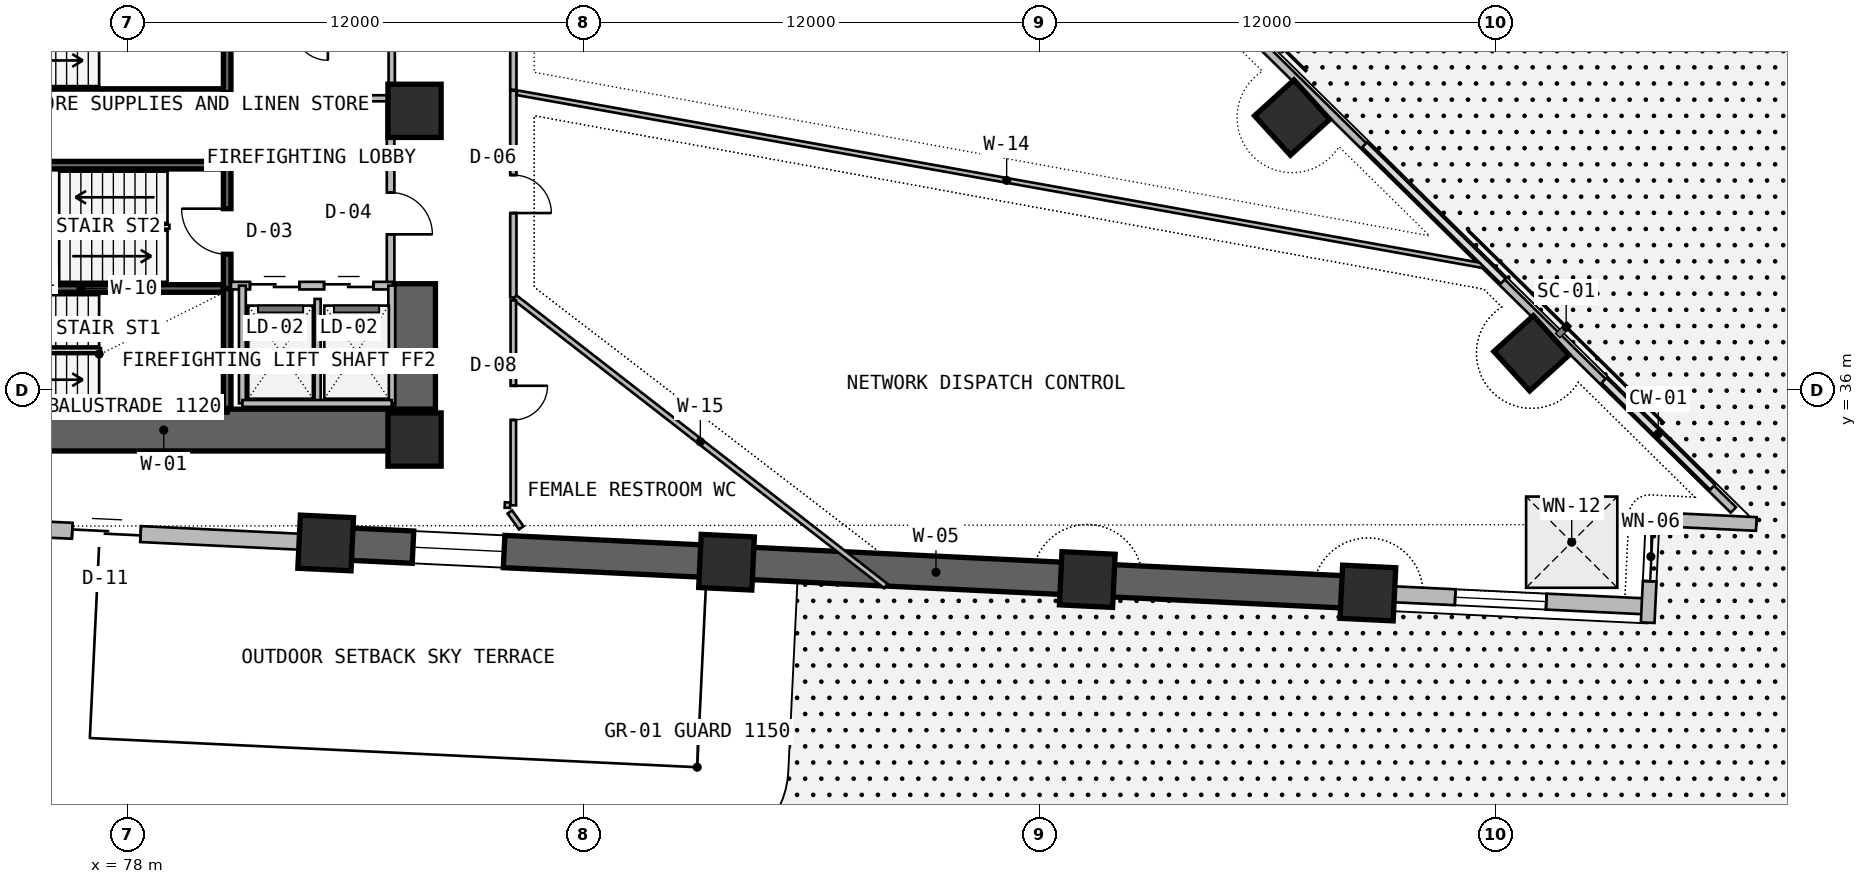
"""IFC4 building model, lengths in metres.
Left out: names, types, materials, properties, quantities, classifications, styles, units other than length and angle.
Written with IfcOpenShell. Run it as: python <this file> out.ifc"""

import sys

from ifc_helpers import new_model, si_unit, direction, frame, frame_2d, origin, origin_2d, place, context, subcontext, project, spatial, rectangle, extrude, element, fill, save


model = new_model("IFC4")
c1 = context("Model", 3, precision=1e-05, world=origin(), true_north=direction((0.0, 1.0)))
c2 = subcontext(c1, "Body", "Model", "MODEL_VIEW")
j1 = project(units=[si_unit("LENGTHUNIT", "METRE"), si_unit("PLANEANGLEUNIT", "RADIAN")], contexts=[c1])
p1 = place(None, origin())
s1 = spatial("IfcSite", under=j1, at=p1, CompositionType="ELEMENT")
p2 = place(p1, origin())
s2 = spatial("IfcBuilding", under=s1, at=p2, CompositionType="ELEMENT")
p3 = place(p2, frame((0.0, 0.0, 26.7)))
s3 = spatial("IfcBuildingStorey", under=s2, at=p3, CompositionType="ELEMENT", Elevation=26.7)
p4 = place(p3, frame((71.8, 34.95, -0.4), z_axis=(0.0, 0.0, 1.0), x_axis=(1.0, 0.0, 0.0)))
e1 = element("IfcWall", 1, at=p4, inside=s3, PredefinedType="SHEAR", context=c2, shape_type="SweptSolid", body=[
    extrude(rectangle(XDim=14.3, YDim=1.1, at=frame_2d((7.15, 0.0))), origin(), (0.0, 0.0, 1.0), 3.8),
])
p5 = place(p3, frame((85.55, 35.5, -0.4), z_axis=(0.0, 0.0, 1.0), x_axis=(0.0, 1.0, 0.0)))
e2 = element("IfcWall", 2, at=p5, inside=s3, PredefinedType="SHEAR", context=c2, shape_type="SweptSolid", body=[
    extrude(rectangle(XDim=3.3, YDim=1.1, at=frame_2d((1.65, 0.0))), origin(), (0.0, 0.0, 1.0), 3.8),
])
for number, where, z_axis, x_axis in (
    (3, (85.55, 34.7, 0.0), (0.0, 0.0, 1.0), (1.0, 0.0, 0.0)),
    (4, (85.55, 43.35, 0.0), (0.0, 0.0, 1.0), (1.0, 0.0, 0.0)),
    (5, (83.212, 31.979, 0.0), (0.0, 0.0, 1.0), (-0.999, 0.048, 0.0)),
    (6, (93.76, 31.472, 0.0), (0.0, 0.0, 1.0), (-0.999, 0.048, 0.0)),
    (7, (103.253, 31.017, 0.0), (0.0, 0.0, 1.0), (-0.999, 0.048, 0.0)),
    (8, (110.636, 30.662, 0.0), (0.0, 0.0, 1.0), (-0.999, 0.048, 0.0)),
    (9, (114.942, 36.97, 0.0), (0.0, 0.0, 1.0), (0.74, 0.672, 0.0)),
    (10, (108.644, 43.172, 0.0), (0.0, 0.0, 1.0), (0.74, 0.672, 0.0)),
):
    element("IfcColumn", number, at=place(p3, frame(where, z_axis=z_axis, x_axis=x_axis)), inside=s3, PredefinedType="COLUMN", context=c2, shape_type="SweptSolid", body=[
        extrude(rectangle(XDim=1.4, YDim=1.4, at=origin_2d()), origin(), (0.0, 0.0, 1.0), 3.6),
    ])
p6 = place(p3, frame((65.281, 32.841, 0.0), z_axis=(0.0, 0.0, 1.0), x_axis=(0.998848298084, -0.047979968897, 0.0)))
e11 = element("IfcWall", 11, at=p6, inside=s3, PredefinedType="SOLIDWALL", context=c2, shape_type="SweptSolid", body=[
    extrude(rectangle(XDim=17.952, YDim=0.42, at=frame_2d((8.976, 0.0))), origin(), (0.0, 0.0, 1.0), 2.385),
])
p7 = place(p6, frame((11.276, 0.0, 0.0)))
e12 = element("IfcOpeningElement", 12, at=p7, cuts=e11, PredefinedType="OPENING", context=c2, shape_type="SweptSolid", body=[
    extrude(rectangle(XDim=1.8, YDim=2.35, at=frame_2d((0.9, 1.175))), frame((0.0, 0.22, 0.0), z_axis=(0.0, -1.0, 0.0), x_axis=(1.0, 0.0, 0.0)), (0.0, 0.0, 1.0), 0.44),
])
p8 = place(p6, frame((0.9, 0.0, 1.2)))
e13 = element("IfcOpeningElement", 13, at=p8, cuts=e11, PredefinedType="OPENING", context=c2, shape_type="SweptSolid", body=[
    extrude(rectangle(XDim=2.4, YDim=0.9, at=frame_2d((1.2, 0.45))), frame((0.0, 0.22, 0.0), z_axis=(0.0, -1.0, 0.0), x_axis=(1.0, 0.0, 0.0)), (0.0, 0.0, 1.0), 0.44),
])
p9 = place(p3, frame((83.212, 31.979, -0.4), z_axis=(0.0, 0.0, 1.0), x_axis=(0.998848235141, -0.047981279227, 0.0)))
e14 = element("IfcWall", 14, at=p9, inside=s3, PredefinedType="SHEAR", context=c2, shape_type="SweptSolid", body=[
    extrude(rectangle(XDim=27.456, YDim=0.85, at=frame_2d((13.728, 0.0))), origin(), (0.0, 0.0, 1.0), 3.8),
])
p10 = place(p9, frame((2.3, 0.0, 1.2)))
e15 = element("IfcOpeningElement", 15, at=p10, cuts=e14, PredefinedType="OPENING", context=c2, shape_type="SweptSolid", body=[
    extrude(rectangle(XDim=2.4, YDim=0.9, at=frame_2d((1.2, 0.45))), frame((0.0, 0.435, 0.0), z_axis=(0.0, -1.0, 0.0), x_axis=(1.0, 0.0, 0.0)), (0.0, 0.0, 1.0), 0.87),
])
p11 = place(p3, frame((110.636, 30.662, 0.0), z_axis=(0.0, 0.0, 1.0), x_axis=(0.998847872759, -0.047988822508, 0.0)))
e16 = element("IfcWall", 16, at=p11, inside=s3, PredefinedType="SOLIDWALL", context=c2, shape_type="SweptSolid", body=[
    extrude(rectangle(XDim=7.392, YDim=0.42, at=frame_2d((3.696, 0.0))), origin(), (0.0, 0.0, 1.0), 2.385),
])
p12 = place(p11, frame((2.3, 0.0, 1.2)))
e17 = element("IfcOpeningElement", 17, at=p12, cuts=e16, PredefinedType="OPENING", context=c2, shape_type="SweptSolid", body=[
    extrude(rectangle(XDim=2.4, YDim=0.9, at=frame_2d((1.2, 0.45))), frame((0.0, 0.22, 0.0), z_axis=(0.0, -1.0, 0.0), x_axis=(1.0, 0.0, 0.0)), (0.0, 0.0, 1.0), 0.44),
])
p13 = place(p3, frame((118.0, 29.883, 0.0), z_axis=(0.0, 0.0, 1.0), x_axis=(0.048024030708, 0.998846180588, 0.0)))
e18 = element("IfcWall", 18, at=p13, inside=s3, PredefinedType="SOLIDWALL", context=c2, shape_type="SweptSolid", body=[
    extrude(rectangle(XDim=2.73, YDim=0.36, at=frame_2d((1.365, 0.0))), origin(), (0.0, 0.0, 1.0), 3.4),
])
p14 = place(p13, frame((1.09, 0.0, 0.45)))
e19 = element("IfcOpeningElement", 19, at=p14, cuts=e18, PredefinedType="OPENING", context=c2, shape_type="SweptSolid", body=[
    extrude(rectangle(XDim=1.3, YDim=2.4, at=frame_2d((0.65, 1.2))), frame((0.0, 0.19, 0.0), z_axis=(0.0, -1.0, 0.0), x_axis=(1.0, 0.0, 0.0)), (0.0, 0.0, 1.0), 0.38),
])
p15 = place(p3, frame((118.131, 32.61, 0.0), z_axis=(0.0, 0.0, 1.0), x_axis=(0.998846180588, -0.048024030708, 0.0)))
e20 = element("IfcWall", 20, at=p15, inside=s3, PredefinedType="SOLIDWALL", context=c2, shape_type="SweptSolid", body=[
    extrude(rectangle(XDim=2.73, YDim=0.36, at=frame_2d((1.365, 0.0))), origin(), (0.0, 0.0, 1.0), 3.4),
])
p16 = place(p3, frame((120.254, 32.848, 0.0), z_axis=(0.0, 0.0, 1.0), x_axis=(-0.71254385441, 0.701627576099, 0.0)))
e21 = element("IfcWall", 21, at=p16, inside=s3, PredefinedType="PARAPET", context=c2, shape_type="SweptSolid", body=[
    extrude(rectangle(XDim=36.142, YDim=0.2, at=frame_2d((18.071, 0.0))), origin(), (0.0, 0.0, 1.0), 1.15),
])
for number, where, z_axis, x_axis in (
    (22, (72.92, 35.52, -0.4), (0.0, 0.0, 1.0), (1.0, 0.0, 0.0)),
    (23, (72.92, 38.675, -0.4), (0.0, 0.0, 1.0), (1.0, 0.0, 0.0)),
):
    element("IfcWall", number, at=place(p3, frame(where, z_axis=z_axis, x_axis=x_axis)), inside=s3, PredefinedType="SOLIDWALL", context=c2, shape_type="SweptSolid", body=[
        extrude(rectangle(XDim=7.7, YDim=0.2, at=frame_2d((3.85, 0.0))), origin(), (0.0, 0.0, 1.0), 3.8),
    ])
p17 = place(p3, frame((80.62, 35.52, -0.4), z_axis=(0.0, 0.0, 1.0), x_axis=(0.0, 1.0, 0.0)))
e24 = element("IfcWall", 24, at=p17, inside=s3, PredefinedType="SOLIDWALL", context=c2, shape_type="SweptSolid", body=[
    extrude(rectangle(XDim=3.155, YDim=0.2, at=frame_2d((1.578, 0.0))), origin(), (0.0, 0.0, 1.0), 3.8),
])
p18 = place(p3, frame((80.62, 38.675, -0.4), z_axis=(0.0, 0.0, 1.0), x_axis=(0.0, 1.0, 0.0)))
e25 = element("IfcWall", 25, at=p18, inside=s3, PredefinedType="SOLIDWALL", context=c2, shape_type="SweptSolid", body=[
    extrude(rectangle(XDim=3.245, YDim=0.2, at=frame_2d((1.623, 0.0))), origin(), (0.0, 0.0, 1.0), 3.8),
])
p19 = place(p18, frame((0.9, 0.0, 0.4)))
e26 = element("IfcOpeningElement", 26, at=p19, cuts=e25, PredefinedType="OPENING", context=c2, shape_type="SweptSolid", body=[
    extrude(rectangle(XDim=1.2, YDim=2.2, at=frame_2d((0.6, 1.1))), frame((0.0, 0.11, 0.0), z_axis=(0.0, -1.0, 0.0), x_axis=(1.0, 0.0, 0.0)), (0.0, 0.0, 1.0), 0.22),
])
p20 = place(p3, frame((80.72, 38.75, 0.0), z_axis=(0.0, 0.0, 1.0), x_axis=(1.0, 0.0, 0.0)))
e27 = element("IfcWall", 27, at=p20, inside=s3, PredefinedType="SOLIDWALL", context=c2, shape_type="SweptSolid", body=[
    extrude(rectangle(XDim=4.26, YDim=0.2, at=frame_2d((2.13, 0.0))), origin(), (0.0, 0.0, 1.0), 3.4),
])
p21 = place(p20, frame((0.5, 0.0, 0.0)))
e28 = element("IfcOpeningElement", 28, at=p21, cuts=e27, PredefinedType="OPENING", context=c2, shape_type="SweptSolid", body=[
    extrude(rectangle(XDim=1.3, YDim=2.3, at=frame_2d((0.65, 1.15))), frame((0.0, 0.11, 0.0), z_axis=(0.0, -1.0, 0.0), x_axis=(1.0, 0.0, 0.0)), (0.0, 0.0, 1.0), 0.22),
])
p22 = place(p20, frame((2.45, 0.0, 0.0)))
e29 = element("IfcOpeningElement", 29, at=p22, cuts=e27, PredefinedType="OPENING", context=c2, shape_type="SweptSolid", body=[
    extrude(rectangle(XDim=1.3, YDim=2.3, at=frame_2d((0.65, 1.15))), frame((0.0, 0.11, 0.0), z_axis=(0.0, -1.0, 0.0), x_axis=(1.0, 0.0, 0.0)), (0.0, 0.0, 1.0), 0.22),
])
p23 = place(p3, frame((83.0, 35.65, 0.0), z_axis=(0.0, 0.0, 1.0), x_axis=(0.0, 1.0, 0.0)))
e30 = element("IfcWall", 30, at=p23, inside=s3, PredefinedType="PLUMBINGWALL", context=c2, shape_type="SweptSolid", body=[
    extrude(rectangle(XDim=2.75, YDim=0.16, at=frame_2d((1.375, 0.0))), origin(), (0.0, 0.0, 1.0), 3.4),
])
for number, where, z_axis, x_axis in (
    (31, (84.95, 35.65, 0.0), (0.0, 0.0, 1.0), (0.0, 1.0, 0.0)),
    (32, (81.02, 35.65, 0.0), (0.0, 0.0, 1.0), (0.0, 1.0, 0.0)),
):
    element("IfcWall", number, at=place(p3, frame(where, z_axis=z_axis, x_axis=x_axis)), inside=s3, PredefinedType="SOLIDWALL", context=c2, shape_type="SweptSolid", body=[
        extrude(rectangle(XDim=3.1, YDim=0.18, at=frame_2d((1.55, 0.0))), origin(), (0.0, 0.0, 1.0), 3.4),
    ])
p24 = place(p3, frame((81.02, 35.65, 0.0), z_axis=(0.0, 0.0, 1.0), x_axis=(1.0, 0.0, 0.0)))
e33 = element("IfcWall", 33, at=p24, inside=s3, PredefinedType="SOLIDWALL", context=c2, shape_type="SweptSolid", body=[
    extrude(rectangle(XDim=3.93, YDim=0.18, at=frame_2d((1.965, 0.0))), origin(), (0.0, 0.0, 1.0), 3.4),
])
p25 = place(p3, frame((84.92, 38.85, 0.0), z_axis=(0.0, 0.0, 1.0), x_axis=(0.0, 1.0, 0.0)))
e34 = element("IfcWall", 34, at=p25, inside=s3, PredefinedType="SOLIDWALL", context=c2, shape_type="SweptSolid", body=[
    extrude(rectangle(XDim=4.83, YDim=0.2, at=frame_2d((2.415, 0.0))), origin(), (0.0, 0.0, 1.0), 3.4),
])
p26 = place(p25, frame((1.25, 0.0, 0.0)))
e35 = element("IfcOpeningElement", 35, at=p26, cuts=e34, PredefinedType="OPENING", context=c2, shape_type="SweptSolid", body=[
    extrude(rectangle(XDim=1.1, YDim=2.2, at=frame_2d((0.55, 1.1))), frame((0.0, 0.11, 0.0), z_axis=(0.0, -1.0, 0.0), x_axis=(1.0, 0.0, 0.0)), (0.0, 0.0, 1.0), 0.22),
])
p27 = place(p3, frame((72.92, 41.92, -0.4), z_axis=(0.0, 0.0, 1.0), x_axis=(1.0, 0.0, 0.0)))
e36 = element("IfcWall", 36, at=p27, inside=s3, PredefinedType="SOLIDWALL", context=c2, shape_type="SweptSolid", body=[
    extrude(rectangle(XDim=7.58, YDim=0.2, at=frame_2d((3.79, 0.0))), origin(), (0.0, 0.0, 1.0), 3.8),
])
p28 = place(p3, frame((72.92, 43.83, -0.4), z_axis=(0.0, 0.0, 1.0), x_axis=(1.0, 0.0, 0.0)))
e37 = element("IfcWall", 37, at=p28, inside=s3, PredefinedType="SOLIDWALL", context=c2, shape_type="SweptSolid", body=[
    extrude(rectangle(XDim=7.7, YDim=0.2, at=frame_2d((3.85, 0.0))), origin(), (0.0, 0.0, 1.0), 3.8),
])
p29 = place(p3, frame((80.62, 43.83, -0.4), z_axis=(0.0, 0.0, 1.0), x_axis=(0.0, 1.0, 0.0)))
e38 = element("IfcWall", 38, at=p29, inside=s3, PredefinedType="SOLIDWALL", context=c2, shape_type="SweptSolid", body=[
    extrude(rectangle(XDim=3.24, YDim=0.2, at=frame_2d((1.62, 0.0))), origin(), (0.0, 0.0, 1.0), 3.8),
])
p30 = place(p3, frame((84.95, 43.68, 0.0), z_axis=(0.0, 0.0, 1.0), x_axis=(0.0, 1.0, 0.0)))
e39 = element("IfcWall", 39, at=p30, inside=s3, PredefinedType="PLUMBINGWALL", context=c2, shape_type="SweptSolid", body=[
    extrude(rectangle(XDim=1.9, YDim=0.165, at=frame_2d((0.95, 0.0))), origin(), (0.0, 0.0, 1.0), 3.4),
])
p31 = place(p3, frame((80.76, 43.68, 0.0), z_axis=(0.0, 0.0, 1.0), x_axis=(1.0, 0.0, 0.0)))
e40 = element("IfcWall", 40, at=p31, inside=s3, PredefinedType="PLUMBINGWALL", context=c2, shape_type="SweptSolid", body=[
    extrude(rectangle(XDim=4.19, YDim=0.16, at=frame_2d((2.095, 0.0))), origin(), (0.0, 0.0, 1.0), 3.4),
])
p32 = place(p3, frame((88.15, 38.439, 0.0), z_axis=(0.0, 0.0, 1.0), x_axis=(0.0, 1.0, 0.0)))
e41 = element("IfcWall", 41, at=p32, inside=s3, PredefinedType="PARTITIONING", context=c2, shape_type="SweptSolid", body=[
    extrude(rectangle(XDim=5.441, YDim=0.165, at=frame_2d((2.72, 0.0))), origin(), (0.0, 0.0, 1.0), 2.785),
])
p33 = place(p32, frame((2.22, 0.0, 0.0)))
e42 = element("IfcOpeningElement", 42, at=p33, cuts=e41, PredefinedType="OPENING", context=c2, shape_type="SweptSolid", body=[
    extrude(rectangle(XDim=1.0, YDim=2.2, at=frame_2d((0.5, 1.1))), frame((0.0, 0.093, 0.0), z_axis=(0.0, -1.0, 0.0), x_axis=(1.0, 0.0, 0.0)), (0.0, 0.0, 1.0), 0.185),
])
p34 = place(p3, frame((97.954, 30.846, 0.0), z_axis=(0.0, 0.0, 1.0), x_axis=(-0.789412787299, 0.613862729972, 0.0)))
e43 = element("IfcWall", 43, at=p34, inside=s3, PredefinedType="PARTITIONING", context=c2, shape_type="SweptSolid", body=[
    extrude(rectangle(XDim=12.37, YDim=0.145, at=frame_2d((6.185, 0.0))), origin(), (0.0, 0.0, 1.0), 2.385),
])
p35 = place(p3, frame((88.244, 43.827, 0.0), z_axis=(0.0, 0.0, 1.0), x_axis=(0.984354244371, -0.176200799059, 0.0)))
e44 = element("IfcWall", 44, at=p35, inside=s3, PredefinedType="PARTITIONING", context=c2, shape_type="SweptSolid", body=[
    extrude(rectangle(XDim=26.183, YDim=0.125, at=frame_2d((13.092, 0.0))), origin(), (0.0, 0.0, 1.0), 2.785),
])
p36 = place(p3, frame((88.15, 32.969, 0.0), z_axis=(0.0, 0.0, 1.0), x_axis=(0.0, 1.0, 0.0)))
e45 = element("IfcWall", 45, at=p36, inside=s3, PredefinedType="PARTITIONING", context=c2, shape_type="SweptSolid", body=[
    extrude(rectangle(XDim=5.394, YDim=0.145, at=frame_2d((2.697, 0.0))), origin(), (0.0, 0.0, 1.0), 2.785),
])
p37 = place(p36, frame((2.247, 0.0, 0.0)))
e46 = element("IfcOpeningElement", 46, at=p37, cuts=e45, PredefinedType="OPENING", context=c2, shape_type="SweptSolid", body=[
    extrude(rectangle(XDim=0.9, YDim=2.1, at=frame_2d((0.45, 1.05))), frame((0.0, 0.083, 0.0), z_axis=(0.0, -1.0, 0.0), x_axis=(1.0, 0.0, 0.0)), (0.0, 0.0, 1.0), 0.165),
])
p38 = place(p3, frame((87.924, 32.979, 0.0), z_axis=(0.0, 0.0, 1.0), x_axis=(0.998828703523, -0.048386165569, 0.0)))
e47 = element("IfcWall", 47, at=p38, inside=s3, PredefinedType="PARTITIONING", context=c2, shape_type="SweptSolid", body=[
    extrude(rectangle(XDim=0.141, YDim=0.145, at=frame_2d((0.071, 0.0))), origin(), (0.0, 0.0, 1.0), 3.4),
])
p39 = place(p3, frame((88.15, 43.905, 0.0), z_axis=(0.0, 0.0, 1.0), x_axis=(0.0, 1.0, 0.0)))
e48 = element("IfcWall", 48, at=p39, inside=s3, PredefinedType="PARTITIONING", context=c2, shape_type="SweptSolid", body=[
    extrude(rectangle(XDim=12.312, YDim=0.165, at=frame_2d((6.156, 0.0))), origin(), (0.0, 0.0, 1.0), 2.785),
])
p40 = place(p39, frame((2.601, 0.0, 0.0)))
e49 = element("IfcOpeningElement", 49, at=p40, cuts=e48, PredefinedType="OPENING", context=c2, shape_type="SweptSolid", body=[
    extrude(rectangle(XDim=1.0, YDim=2.2, at=frame_2d((0.5, 1.1))), frame((0.0, 0.093, 0.0), z_axis=(0.0, -1.0, 0.0), x_axis=(1.0, 0.0, 0.0)), (0.0, 0.0, 1.0), 0.185),
])
p41 = place(p3, frame((88.358, 32.378, 0.0), z_axis=(0.0, 0.0, 1.0), x_axis=(-0.585265597374, 0.810841649479, 0.0)))
e50 = element("IfcWall", 50, at=p41, inside=s3, PredefinedType="PARTITIONING", context=c2, shape_type="SweptSolid", body=[
    extrude(rectangle(XDim=0.515, YDim=0.145, at=frame_2d((0.258, 0.0))), origin(), (0.0, 0.0, 1.0), 2.935),
])
p42 = place(p3, frame((0.0, 0.0, -0.35)))
p43 = place(p42, frame((116.0, 32.0, -0.01)))
p44 = place(p43, frame((0.0, 0.0, 0.31)))
e51 = element("IfcWindow", 51, at=p44, inside=s3, PartitioningType="SINGLE_PANEL", PredefinedType="SKYLIGHT", context=c2, shape_type="SweptSolid", body=[
    extrude(rectangle(XDim=2.4, YDim=2.4, at=origin_2d()), origin(), (0.0, 0.0, 1.0), 0.05),
])
p45 = place(p7, origin())
e52 = element("IfcDoor", 52, at=p45, inside=s3, OperationType="DOUBLE_DOOR_SLIDING", PredefinedType="DOOR", context=c2, shape_type="SweptSolid", body=[
    extrude(rectangle(XDim=1.8, YDim=2.35, at=frame_2d((0.9, 1.175))), frame((0.0, 0.025, 0.0), z_axis=(0.0, -1.0, 0.0), x_axis=(1.0, 0.0, 0.0)), (0.0, 0.0, 1.0), 0.05),
])
fill(e12, e52)
p46 = place(p10, origin())
e53 = element("IfcWindow", 53, at=p46, inside=s3, PartitioningType="SINGLE_PANEL", PredefinedType="WINDOW", context=c2, shape_type="SweptSolid", body=[
    extrude(rectangle(XDim=2.4, YDim=0.9, at=frame_2d((1.2, 0.45))), frame((0.0, 0.03, 0.0), z_axis=(0.0, -1.0, 0.0), x_axis=(1.0, 0.0, 0.0)), (0.0, 0.0, 1.0), 0.06),
])
fill(e15, e53)
p47 = place(p12, origin())
e54 = element("IfcWindow", 54, at=p47, inside=s3, PartitioningType="SINGLE_PANEL", PredefinedType="WINDOW", context=c2, shape_type="SweptSolid", body=[
    extrude(rectangle(XDim=2.4, YDim=0.9, at=frame_2d((1.2, 0.45))), frame((0.0, 0.03, 0.0), z_axis=(0.0, -1.0, 0.0), x_axis=(1.0, 0.0, 0.0)), (0.0, 0.0, 1.0), 0.06),
])
fill(e17, e54)
p48 = place(p14, origin())
e55 = element("IfcWindow", 55, at=p48, inside=s3, PartitioningType="SINGLE_PANEL", PredefinedType="WINDOW", context=c2, shape_type="SweptSolid", body=[
    extrude(rectangle(XDim=1.3, YDim=2.4, at=frame_2d((0.65, 1.2))), frame((0.0, 0.03, 0.0), z_axis=(0.0, -1.0, 0.0), x_axis=(1.0, 0.0, 0.0)), (0.0, 0.0, 1.0), 0.06),
])
fill(e19, e55)
p49 = place(p19, origin())
e56 = element("IfcDoor", 56, at=p49, inside=s3, OperationType="SINGLE_SWING_RIGHT", PredefinedType="USERDEFINED", context=c2, shape_type="SweptSolid", body=[
    extrude(rectangle(XDim=1.2, YDim=2.2, at=frame_2d((0.6, 1.1))), frame((0.0, 0.025, 0.0), z_axis=(0.0, -1.0, 0.0), x_axis=(1.0, 0.0, 0.0)), (0.0, 0.0, 1.0), 0.05),
])
fill(e26, e56)
p50 = place(p21, origin())
e57 = element("IfcDoor", 57, at=p50, inside=s3, OperationType="DOUBLE_DOOR_SLIDING", PredefinedType="DOOR", context=c2, shape_type="SweptSolid", body=[
    extrude(rectangle(XDim=1.3, YDim=2.3, at=frame_2d((0.65, 1.15))), frame((0.0, 0.025, 0.0), z_axis=(0.0, -1.0, 0.0), x_axis=(1.0, 0.0, 0.0)), (0.0, 0.0, 1.0), 0.05),
])
fill(e28, e57)
p51 = place(p22, origin())
e58 = element("IfcDoor", 58, at=p51, inside=s3, OperationType="DOUBLE_DOOR_SLIDING", PredefinedType="DOOR", context=c2, shape_type="SweptSolid", body=[
    extrude(rectangle(XDim=1.3, YDim=2.3, at=frame_2d((0.65, 1.15))), frame((0.0, 0.025, 0.0), z_axis=(0.0, -1.0, 0.0), x_axis=(1.0, 0.0, 0.0)), (0.0, 0.0, 1.0), 0.05),
])
fill(e29, e58)
p52 = place(p26, frame((1.1, 0.0, 0.0), z_axis=(0.0, 0.0, 1.0), x_axis=(-1.0, 0.0, 0.0)))
e59 = element("IfcDoor", 59, at=p52, inside=s3, OperationType="SINGLE_SWING_RIGHT", PredefinedType="DOOR", context=c2, shape_type="SweptSolid", body=[
    extrude(rectangle(XDim=1.1, YDim=2.2, at=frame_2d((0.55, 1.1))), frame((0.0, 0.025, 0.0), z_axis=(0.0, -1.0, 0.0), x_axis=(1.0, 0.0, 0.0)), (0.0, 0.0, 1.0), 0.05),
])
fill(e35, e59)
p53 = place(p33, frame((1.0, 0.0, 0.0), z_axis=(0.0, 0.0, 1.0), x_axis=(-1.0, 0.0, 0.0)))
e60 = element("IfcDoor", 60, at=p53, inside=s3, OperationType="SINGLE_SWING_RIGHT", PredefinedType="DOOR", context=c2, shape_type="SweptSolid", body=[
    extrude(rectangle(XDim=1.0, YDim=2.2, at=frame_2d((0.5, 1.1))), frame((0.0, 0.025, 0.0), z_axis=(0.0, -1.0, 0.0), x_axis=(1.0, 0.0, 0.0)), (0.0, 0.0, 1.0), 0.05),
])
fill(e42, e60)
p54 = place(p37, frame((0.9, 0.0, 0.0), z_axis=(0.0, 0.0, 1.0), x_axis=(-1.0, 0.0, 0.0)))
e61 = element("IfcDoor", 61, at=p54, inside=s3, OperationType="SINGLE_SWING_LEFT", PredefinedType="DOOR", context=c2, shape_type="SweptSolid", body=[
    extrude(rectangle(XDim=0.9, YDim=2.1, at=frame_2d((0.45, 1.05))), frame((0.0, 0.025, 0.0), z_axis=(0.0, -1.0, 0.0), x_axis=(1.0, 0.0, 0.0)), (0.0, 0.0, 1.0), 0.05),
])
fill(e46, e61)
save(model, sys.argv[1])
